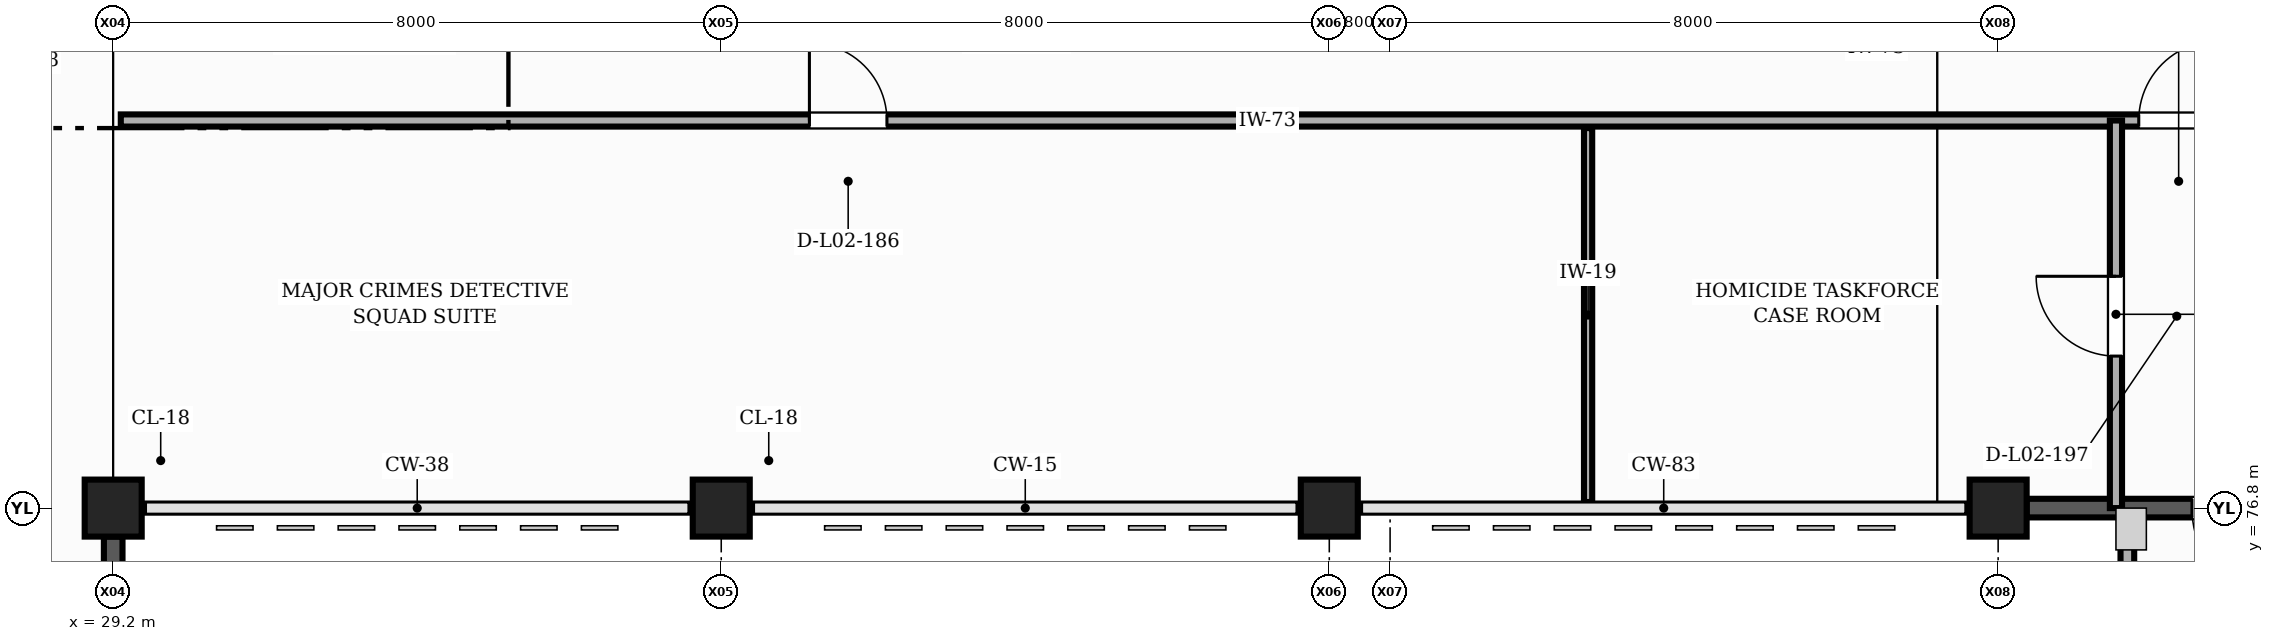
"""IFC4 building model, lengths in metres.
Left out: names, types, materials, properties, quantities, classifications, styles, units other than length and angle.
Written with IfcOpenShell. Run it as: python <this file> out.ifc"""

import sys

from ifc_helpers import new_model, si_unit, direction, frame, frame_2d, origin, origin_2d, place, context, subcontext, project, spatial, rectangle, extrude, element, fill, save


model = new_model("IFC4")
c1 = context("Model", 3, precision=1e-05, world=origin(), true_north=direction((0.0, 1.0)))
c2 = subcontext(c1, "Body", "Model", "MODEL_VIEW")
j1 = project(units=[si_unit("LENGTHUNIT", "METRE"), si_unit("PLANEANGLEUNIT", "RADIAN")], contexts=[c1])
p1 = place(None, origin())
s1 = spatial("IfcSite", under=j1, at=p1, CompositionType="ELEMENT")
p2 = place(p1, origin())
s2 = spatial("IfcBuilding", under=s1, at=p2, CompositionType="ELEMENT")
p3 = place(p2, frame((0.0, 0.0, 9.0)))
s3 = spatial("IfcBuildingStorey", under=s2, at=p3, CompositionType="ELEMENT", Elevation=9.0)
for number, where, z_axis, x_axis in (
    (1, (29.2, 76.8, 0.0), (0.0, 0.0, 1.0), (1.0, 0.0, 0.0)),
    (2, (37.2, 76.8, 0.0), (0.0, 0.0, 1.0), (1.0, 0.0, 0.0)),
    (3, (45.2, 76.8, 0.0), (0.0, 0.0, 1.0), (1.0, 0.0, 0.0)),
    (4, (54.0, 76.8, 0.0), (0.0, 0.0, 1.0), (1.0, 0.0, 0.0)),
):
    element("IfcColumn", number, at=place(p3, frame(where, z_axis=z_axis, x_axis=x_axis)), inside=s3, PredefinedType="COLUMN", context=c2, shape_type="SweptSolid", body=[
        extrude(rectangle(XDim=0.75, YDim=0.75, at=origin_2d()), origin(), (0.0, 0.0, 1.0), 4.5),
    ])
p4 = place(p3, frame((29.2, 69.1, 0.0), z_axis=(0.0, 0.0, 1.0), x_axis=(0.0, 1.0, 0.0)))
e5 = element("IfcWall", 5, at=p4, inside=s3, PredefinedType="SOLIDWALL", context=c2, shape_type="SweptSolid", body=[
    extrude(rectangle(XDim=7.325, YDim=0.245, at=frame_2d((3.663, 0.0))), origin(), (0.0, 0.0, 1.0), 3.57),
])
p5 = place(p4, frame((2.062, 0.0, 0.9)))
e6 = element("IfcOpeningElement", 6, at=p5, cuts=e5, PredefinedType="OPENING", context=c2, shape_type="SweptSolid", body=[
    extrude(rectangle(XDim=3.2, YDim=2.0, at=frame_2d((1.6, 1.0))), frame((0.0, 0.133, 0.0), z_axis=(0.0, -1.0, 0.0), x_axis=(1.0, 0.0, 0.0)), (0.0, 0.0, 1.0), 0.265),
])
p6 = place(p3, frame((54.375, 76.8, 0.0), z_axis=(0.0, 0.0, 1.0), x_axis=(1.0, 0.0, 0.0)))
e7 = element("IfcWall", 7, at=p6, inside=s3, PredefinedType="SOLIDWALL", context=c2, shape_type="SweptSolid", body=[
    extrude(rectangle(XDim=7.25, YDim=0.245, at=frame_2d((3.625, 0.0))), origin(), (0.0, 0.0, 1.0), 3.57),
])
p7 = place(p6, frame((2.175, 0.0, 0.0)))
e8 = element("IfcOpeningElement", 8, at=p7, cuts=e7, PredefinedType="OPENING", context=c2, shape_type="SweptSolid", body=[
    extrude(rectangle(XDim=1.3, YDim=2.2, at=frame_2d((0.65, 1.1))), frame((0.0, 0.133, 0.0), z_axis=(0.0, -1.0, 0.0), x_axis=(1.0, 0.0, 0.0)), (0.0, 0.0, 1.0), 0.265),
])
p8 = place(p3, frame((55.7, 60.15, 0.0), z_axis=(0.0, 0.0, 1.0), x_axis=(0.0, 1.0, 0.0)))
e9 = element("IfcWall", 9, at=p8, inside=s3, PredefinedType="PARAPET", context=c2, shape_type="SweptSolid", body=[
    extrude(rectangle(XDim=16.5, YDim=0.18, at=frame_2d((8.25, 0.0))), origin(), (0.0, 0.0, 1.0), 3.1),
])
p9 = place(p3, frame((48.605, 76.88, 0.0), z_axis=(0.0, 0.0, 1.0), x_axis=(0.0, 1.0, 0.0)))
e10 = element("IfcWall", 10, at=p9, inside=s3, PredefinedType="PARTITIONING", context=c2, shape_type="SweptSolid", body=[
    extrude(rectangle(XDim=4.92, YDim=0.108, at=frame_2d((2.46, 0.0))), origin(), (0.0, 0.0, 1.0), 4.22),
])
p10 = place(p3, frame((29.3, 81.9, 0.0), z_axis=(0.0, 0.0, 1.0), x_axis=(1.0, 0.0, 0.0)))
e11 = element("IfcWall", 11, at=p10, inside=s3, PredefinedType="PARTITIONING", context=c2, shape_type="SweptSolid", body=[
    extrude(rectangle(XDim=72.62, YDim=0.16, at=frame_2d((36.31, 0.0))), origin(), (0.0, 0.0, 1.0), 3.555),
])
p11 = place(p10, frame((9.06, 0.0, 0.0)))
e12 = element("IfcOpeningElement", 12, at=p11, cuts=e11, PredefinedType="OPENING", context=c2, shape_type="SweptSolid", body=[
    extrude(rectangle(XDim=1.02, YDim=2.12, at=frame_2d((0.51, 1.06))), frame((0.0, 0.09, 0.0), z_axis=(0.0, -1.0, 0.0), x_axis=(1.0, 0.0, 0.0)), (0.0, 0.0, 1.0), 0.18),
])
p12 = place(p10, frame((26.55, 0.0, 0.0)))
e13 = element("IfcOpeningElement", 13, at=p12, cuts=e11, PredefinedType="OPENING", context=c2, shape_type="SweptSolid", body=[
    extrude(rectangle(XDim=1.05, YDim=2.1, at=frame_2d((0.525, 1.05))), frame((0.0, 0.09, 0.0), z_axis=(0.0, -1.0, 0.0), x_axis=(1.0, 0.0, 0.0)), (0.0, 0.0, 1.0), 0.18),
])
p13 = place(p10, frame((39.04, 0.0, 0.0)))
e14 = element("IfcOpeningElement", 14, at=p13, cuts=e11, PredefinedType="OPENING", context=c2, shape_type="SweptSolid", body=[
    extrude(rectangle(XDim=1.08, YDim=2.14, at=frame_2d((0.54, 1.07))), frame((0.0, 0.09, 0.0), z_axis=(0.0, -1.0, 0.0), x_axis=(1.0, 0.0, 0.0)), (0.0, 0.0, 1.0), 0.18),
])
p14 = place(p10, frame((52.03, 0.0, 0.0)))
e15 = element("IfcOpeningElement", 15, at=p14, cuts=e11, PredefinedType="OPENING", context=c2, shape_type="SweptSolid", body=[
    extrude(rectangle(XDim=1.1, YDim=2.1, at=frame_2d((0.55, 1.05))), frame((0.0, 0.09, 0.0), z_axis=(0.0, -1.0, 0.0), x_axis=(1.0, 0.0, 0.0)), (0.0, 0.0, 1.0), 0.18),
])
p15 = place(p10, frame((65.63, 0.0, 0.0)))
e16 = element("IfcOpeningElement", 16, at=p15, cuts=e11, PredefinedType="OPENING", context=c2, shape_type="SweptSolid", body=[
    extrude(rectangle(XDim=0.9, YDim=2.1, at=frame_2d((0.45, 1.05))), frame((0.0, 0.09, 0.0), z_axis=(0.0, -1.0, 0.0), x_axis=(1.0, 0.0, 0.0)), (0.0, 0.0, 1.0), 0.18),
])
p16 = place(p3, frame((55.55, 76.8, 0.0), z_axis=(0.0, 0.0, 1.0), x_axis=(0.0, 1.0, 0.0)))
e17 = element("IfcWall", 17, at=p16, inside=s3, PredefinedType="PARTITIONING", context=c2, shape_type="SweptSolid", body=[
    extrude(rectangle(XDim=5.1, YDim=0.16, at=frame_2d((2.55, 0.0))), origin(), (0.0, 0.0, 1.0), 3.555),
])
p17 = place(p16, frame((2.0, 0.0, 0.0)))
e18 = element("IfcOpeningElement", 18, at=p17, cuts=e17, PredefinedType="OPENING", context=c2, shape_type="SweptSolid", body=[
    extrude(rectangle(XDim=1.05, YDim=2.1, at=frame_2d((0.525, 1.05))), frame((0.0, 0.09, 0.0), z_axis=(0.0, -1.0, 0.0), x_axis=(1.0, 0.0, 0.0)), (0.0, 0.0, 1.0), 0.18),
])
p18 = place(p7, frame((1.3, 0.0, 0.0), z_axis=(0.0, 0.0, 1.0), x_axis=(-1.0, 0.0, 0.0)))
e19 = element("IfcDoor", 19, at=p18, inside=s3, OperationType="SINGLE_SWING_LEFT", PredefinedType="DOOR", context=c2, shape_type="SweptSolid", body=[
    extrude(rectangle(XDim=1.3, YDim=2.2, at=frame_2d((0.65, 1.1))), frame((0.0, 0.025, 0.0), z_axis=(0.0, -1.0, 0.0), x_axis=(1.0, 0.0, 0.0)), (0.0, 0.0, 1.0), 0.05),
])
fill(e8, e19)
p19 = place(p11, origin())
e20 = element("IfcDoor", 20, at=p19, inside=s3, OperationType="SINGLE_SWING_LEFT", PredefinedType="DOOR", context=c2, shape_type="SweptSolid", body=[
    extrude(rectangle(XDim=1.02, YDim=2.12, at=frame_2d((0.51, 1.06))), frame((0.0, 0.025, 0.0), z_axis=(0.0, -1.0, 0.0), x_axis=(1.0, 0.0, 0.0)), (0.0, 0.0, 1.0), 0.05),
])
fill(e12, e20)
p20 = place(p12, origin())
e21 = element("IfcDoor", 21, at=p20, inside=s3, OperationType="SINGLE_SWING_RIGHT", PredefinedType="DOOR", context=c2, shape_type="SweptSolid", body=[
    extrude(rectangle(XDim=1.05, YDim=2.1, at=frame_2d((0.525, 1.05))), frame((0.0, 0.025, 0.0), z_axis=(0.0, -1.0, 0.0), x_axis=(1.0, 0.0, 0.0)), (0.0, 0.0, 1.0), 0.05),
])
fill(e13, e21)
p21 = place(p17, origin())
e22 = element("IfcDoor", 22, at=p21, inside=s3, OperationType="SINGLE_SWING_RIGHT", PredefinedType="DOOR", context=c2, shape_type="SweptSolid", body=[
    extrude(rectangle(XDim=1.05, YDim=2.1, at=frame_2d((0.525, 1.05))), frame((0.0, 0.025, 0.0), z_axis=(0.0, -1.0, 0.0), x_axis=(1.0, 0.0, 0.0)), (0.0, 0.0, 1.0), 0.05),
])
fill(e18, e22)
save(model, sys.argv[1])
